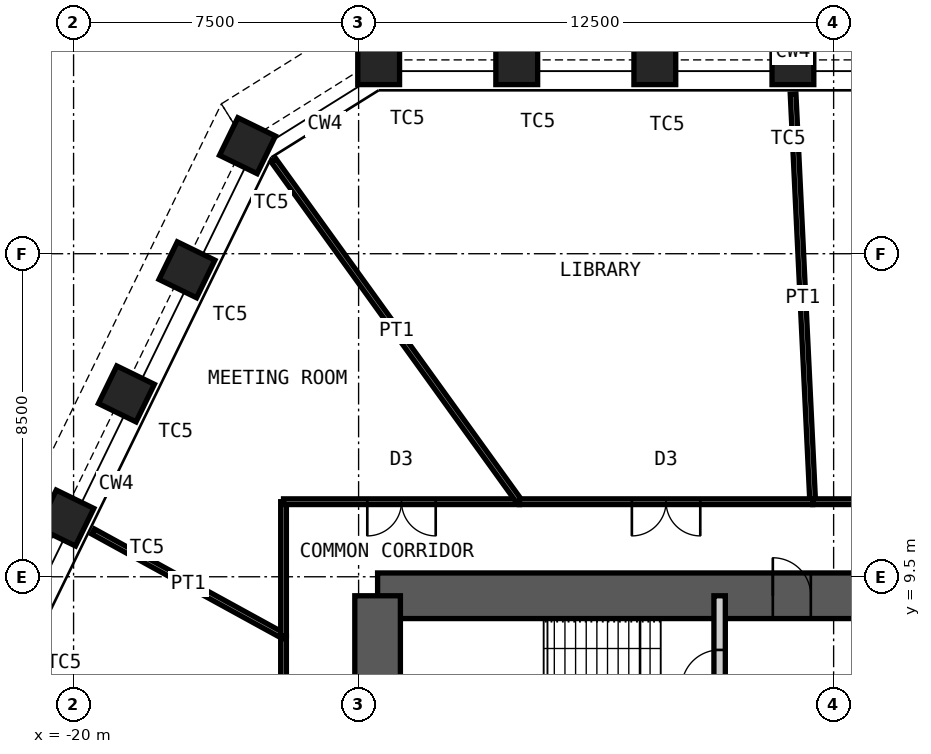
"""IFC4 building model, lengths in metres.
Left out: names, types, materials, properties, quantities, classifications, styles, units other than length and angle.
Written with IfcOpenShell. Run it as: python <this file> out.ifc"""

import sys

from ifc_helpers import new_model, si_unit, direction, frame, frame_2d, origin, origin_2d, place, context, subcontext, project, spatial, rectangle, hollow_rectangle, extrude, element, fill, save


model = new_model("IFC4")
c1 = context("Model", 3, precision=1e-05, world=origin(), true_north=direction((0.0, 1.0)))
c2 = subcontext(c1, "Body", "Model", "MODEL_VIEW")
j1 = project(units=[si_unit("LENGTHUNIT", "METRE"), si_unit("PLANEANGLEUNIT", "RADIAN")], contexts=[c1])
p1 = place(None, origin())
s1 = spatial("IfcSite", under=j1, at=p1, CompositionType="ELEMENT")
p2 = place(p1, origin())
s2 = spatial("IfcBuilding", under=s1, at=p2, CompositionType="ELEMENT")
p3 = place(p2, frame((0.0, 0.0, 218.2)))
s3 = spatial("IfcBuildingStorey", under=s2, at=p3, CompositionType="ELEMENT", Elevation=218.2)
for number, where, z_axis, x_axis in (
    (1, (-11.972, 23.0, 0.0), (0.0, 0.0, 1.0), (-1.0, 0.0, 0.0)),
    (2, (-8.338, 23.0, 0.0), (0.0, 0.0, 1.0), (-1.0, 0.0, 0.0)),
    (3, (-4.705, 23.0, 0.0), (0.0, 0.0, 1.0), (-1.0, 0.0, 0.0)),
    (4, (-1.071, 23.0, 0.0), (0.0, 0.0, 1.0), (-1.0, 0.0, 0.0)),
    (5, (-20.203, 11.045, 0.0), (0.0, 0.0, 1.0), (-0.438, -0.899, 0.0)),
    (6, (-18.61, 14.311, 0.0), (0.0, 0.0, 1.0), (-0.438, -0.899, 0.0)),
    (7, (-17.017, 17.577, 0.0), (0.0, 0.0, 1.0), (-0.438, -0.899, 0.0)),
    (8, (-15.424, 20.843, 0.0), (0.0, 0.0, 1.0), (-0.438, -0.899, 0.0)),
):
    element("IfcColumn", number, at=place(p3, frame(where, z_axis=z_axis, x_axis=x_axis)), inside=s3, PredefinedType="COLUMN", context=c2, shape_type="SweptSolid", body=[
        extrude(hollow_rectangle(XDim=1.1, YDim=1.1, WallThickness=0.07, at=origin_2d()), origin(), (0.0, 0.0, 1.0), 4.2),
    ])
p4 = place(p3, frame((-12.0, 9.0, 0.0), z_axis=(0.0, 0.0, 1.0), x_axis=(1.0, 0.0, 0.0)))
e9 = element("IfcWall", 9, at=p4, inside=s3, PredefinedType="SHEAR", context=c2, shape_type="SweptSolid", body=[
    extrude(rectangle(XDim=24.0, YDim=1.2, at=frame_2d((12.0, 0.0))), origin(), (0.0, 0.0, 1.0), 4.2),
])
p5 = place(p4, frame((10.4, 0.0, 0.0)))
e10 = element("IfcOpeningElement", 10, at=p5, cuts=e9, PredefinedType="OPENING", context=c2, shape_type="SweptSolid", body=[
    extrude(rectangle(XDim=1.0, YDim=2.1, at=frame_2d((0.5, 1.05))), frame((0.0, 0.61, 0.0), z_axis=(0.0, -1.0, 0.0), x_axis=(1.0, 0.0, 0.0)), (0.0, 0.0, 1.0), 1.22),
])
p6 = place(p4, frame((17.6, 0.0, 0.0)))
e11 = element("IfcOpeningElement", 11, at=p6, cuts=e9, PredefinedType="OPENING", context=c2, shape_type="SweptSolid", body=[
    extrude(rectangle(XDim=0.9, YDim=2.1, at=frame_2d((0.45, 1.05))), frame((0.0, 0.61, 0.0), z_axis=(0.0, -1.0, 0.0), x_axis=(1.0, 0.0, 0.0)), (0.0, 0.0, 1.0), 1.22),
])
p7 = place(p4, frame((21.9, 0.0, 0.0)))
e12 = element("IfcOpeningElement", 12, at=p7, cuts=e9, PredefinedType="OPENING", context=c2, shape_type="SweptSolid", body=[
    extrude(rectangle(XDim=0.9, YDim=2.1, at=frame_2d((0.45, 1.05))), frame((0.0, 0.61, 0.0), z_axis=(0.0, -1.0, 0.0), x_axis=(1.0, 0.0, 0.0)), (0.0, 0.0, 1.0), 1.22),
])
p8 = place(p3, frame((-12.0, -9.0, 0.0), z_axis=(0.0, 0.0, 1.0), x_axis=(0.0, 1.0, 0.0)))
e13 = element("IfcWall", 13, at=p8, inside=s3, PredefinedType="SHEAR", context=c2, shape_type="SweptSolid", body=[
    extrude(rectangle(XDim=18.0, YDim=1.2, at=frame_2d((9.0, 0.0))), origin(), (0.0, 0.0, 1.0), 4.2),
])
p9 = place(p8, frame((8.1, 0.0, 0.0)))
e14 = element("IfcOpeningElement", 14, at=p9, cuts=e13, PredefinedType="OPENING", context=c2, shape_type="SweptSolid", body=[
    extrude(rectangle(XDim=1.8, YDim=2.1, at=frame_2d((0.9, 1.05))), frame((0.0, 0.61, 0.0), z_axis=(0.0, -1.0, 0.0), x_axis=(1.0, 0.0, 0.0)), (0.0, 0.0, 1.0), 1.22),
])
p10 = place(p3, frame((-3.0, 5.15, 0.0), z_axis=(0.0, 0.0, 1.0), x_axis=(0.0, 1.0, 0.0)))
e15 = element("IfcWall", 15, at=p10, inside=s3, PredefinedType="PARTITIONING", context=c2, shape_type="SweptSolid", body=[
    extrude(rectangle(XDim=3.85, YDim=0.3, at=frame_2d((1.925, 0.0))), origin(), (0.0, 0.0, 1.0), 3.98),
])
p11 = place(p10, frame((1.425, 0.0, 0.0)))
e16 = element("IfcOpeningElement", 16, at=p11, cuts=e15, PredefinedType="OPENING", context=c2, shape_type="SweptSolid", body=[
    extrude(rectangle(XDim=1.0, YDim=2.1, at=frame_2d((0.5, 1.05))), frame((0.0, 0.16, 0.0), z_axis=(0.0, -1.0, 0.0), x_axis=(1.0, 0.0, 0.0)), (0.0, 0.0, 1.0), 0.32),
])
p12 = place(p3, frame((-1.067, 22.2, 0.0), z_axis=(0.0, 0.0, 1.0), x_axis=(0.047998335863, -0.998847415652, 0.0)))
e17 = element("IfcWall", 17, at=p12, inside=s3, PredefinedType="PARTITIONING", context=c2, shape_type="SweptSolid", body=[
    extrude(rectangle(XDim=10.738, YDim=0.15, at=frame_2d((5.369, 0.0))), origin(), (0.0, 0.0, 1.0), 3.43),
])
p13 = place(p3, frame((-0.551, 11.475, 0.0), z_axis=(0.0, 0.0, 1.0), x_axis=(1.0, 0.0, 0.0)))
e18 = element("IfcWall", 18, at=p13, inside=s3, PredefinedType="PARTITIONING", context=c2, shape_type="SweptSolid", body=[
    extrude(rectangle(XDim=15.026, YDim=0.15, at=frame_2d((7.513, 0.0))), origin(), (0.0, 0.0, 1.0), 4.03),
])
p14 = place(p13, frame((6.613, 0.0, 0.0)))
e19 = element("IfcOpeningElement", 19, at=p14, cuts=e18, PredefinedType="OPENING", context=c2, shape_type="SweptSolid", body=[
    extrude(rectangle(XDim=1.8, YDim=2.4, at=frame_2d((0.9, 1.2))), frame((0.0, 0.085, 0.0), z_axis=(0.0, -1.0, 0.0), x_axis=(1.0, 0.0, 0.0)), (0.0, 0.0, 1.0), 0.17),
])
p15 = place(p3, frame((-14.475, 2.676, 0.0), z_axis=(0.0, 0.0, 1.0), x_axis=(0.0, 1.0, 0.0)))
e20 = element("IfcWall", 20, at=p15, inside=s3, PredefinedType="PARTITIONING", context=c2, shape_type="SweptSolid", body=[
    extrude(rectangle(XDim=5.266, YDim=0.15, at=frame_2d((2.633, 0.0))), origin(), (0.0, 0.0, 1.0), 4.03),
])
p16 = place(p15, frame((2.133, 0.0, 0.0)))
e21 = element("IfcOpeningElement", 21, at=p16, cuts=e20, PredefinedType="OPENING", context=c2, shape_type="SweptSolid", body=[
    extrude(rectangle(XDim=1.0, YDim=2.4, at=frame_2d((0.5, 1.2))), frame((0.0, 0.085, 0.0), z_axis=(0.0, -1.0, 0.0), x_axis=(1.0, 0.0, 0.0)), (0.0, 0.0, 1.0), 0.17),
])
p17 = place(p3, frame((-19.486, 10.69, 0.0), z_axis=(0.0, 0.0, 1.0), x_axis=(0.876724089264, -0.480993629172, 0.0)))
e22 = element("IfcWall", 22, at=p17, inside=s3, PredefinedType="PARTITIONING", context=c2, shape_type="SweptSolid", body=[
    extrude(rectangle(XDim=5.715, YDim=0.15, at=frame_2d((2.858, 0.0))), origin(), (0.0, 0.0, 1.0), 3.43),
])
p18 = place(p3, frame((-14.475, 7.941, 0.0), z_axis=(0.0, 0.0, 1.0), x_axis=(0.0, 1.0, 0.0)))
e23 = element("IfcWall", 23, at=p18, inside=s3, PredefinedType="PARTITIONING", context=c2, shape_type="SweptSolid", body=[
    extrude(rectangle(XDim=3.534, YDim=0.15, at=frame_2d((1.767, 0.0))), origin(), (0.0, 0.0, 1.0), 4.03),
])
p19 = place(p3, frame((-14.475, 11.475, 0.0), z_axis=(0.0, 0.0, 1.0), x_axis=(1.0, 0.0, 0.0)))
e24 = element("IfcWall", 24, at=p19, inside=s3, PredefinedType="PARTITIONING", context=c2, shape_type="SweptSolid", body=[
    extrude(rectangle(XDim=6.208, YDim=0.15, at=frame_2d((3.104, 0.0))), origin(), (0.0, 0.0, 1.0), 4.03),
])
p20 = place(p19, frame((2.204, 0.0, 0.0)))
e25 = element("IfcOpeningElement", 25, at=p20, cuts=e24, PredefinedType="OPENING", context=c2, shape_type="SweptSolid", body=[
    extrude(rectangle(XDim=1.8, YDim=2.4, at=frame_2d((0.9, 1.2))), frame((0.0, 0.085, 0.0), z_axis=(0.0, -1.0, 0.0), x_axis=(1.0, 0.0, 0.0)), (0.0, 0.0, 1.0), 0.17),
])
p21 = place(p3, frame((-14.737, 20.455, 0.0), z_axis=(0.0, 0.0, 1.0), x_axis=(0.584547025688, -0.811359830629, 0.0)))
e26 = element("IfcWall", 26, at=p21, inside=s3, PredefinedType="PARTITIONING", context=c2, shape_type="SweptSolid", body=[
    extrude(rectangle(XDim=11.068, YDim=0.15, at=frame_2d((5.534, 0.0))), origin(), (0.0, 0.0, 1.0), 2.93),
])
p22 = place(p3, frame((-8.267, 11.475, 0.0), z_axis=(0.0, 0.0, 1.0), x_axis=(1.0, 0.0, 0.0)))
e27 = element("IfcWall", 27, at=p22, inside=s3, PredefinedType="PARTITIONING", context=c2, shape_type="SweptSolid", body=[
    extrude(rectangle(XDim=7.716, YDim=0.15, at=frame_2d((3.858, 0.0))), origin(), (0.0, 0.0, 1.0), 4.03),
])
p23 = place(p22, frame((2.958, 0.0, 0.0)))
e28 = element("IfcOpeningElement", 28, at=p23, cuts=e27, PredefinedType="OPENING", context=c2, shape_type="SweptSolid", body=[
    extrude(rectangle(XDim=1.8, YDim=2.4, at=frame_2d((0.9, 1.2))), frame((0.0, 0.085, 0.0), z_axis=(0.0, -1.0, 0.0), x_axis=(1.0, 0.0, 0.0)), (0.0, 0.0, 1.0), 0.17),
])
p24 = place(p5, origin())
e29 = element("IfcDoor", 29, at=p24, inside=s3, OperationType="SINGLE_SWING_RIGHT", PredefinedType="DOOR", context=c2, shape_type="SweptSolid", body=[
    extrude(rectangle(XDim=1.0, YDim=2.1, at=frame_2d((0.5, 1.05))), frame((0.0, 0.025, 0.0), z_axis=(0.0, -1.0, 0.0), x_axis=(1.0, 0.0, 0.0)), (0.0, 0.0, 1.0), 0.05),
])
fill(e10, e29)
p25 = place(p11, origin())
e30 = element("IfcDoor", 30, at=p25, inside=s3, OperationType="SINGLE_SWING_RIGHT", PredefinedType="DOOR", context=c2, shape_type="SweptSolid", body=[
    extrude(rectangle(XDim=1.0, YDim=2.1, at=frame_2d((0.5, 1.05))), frame((0.0, 0.025, 0.0), z_axis=(0.0, -1.0, 0.0), x_axis=(1.0, 0.0, 0.0)), (0.0, 0.0, 1.0), 0.05),
])
fill(e16, e30)
p26 = place(p20, origin())
e31 = element("IfcDoor", 31, at=p26, inside=s3, OperationType="DOUBLE_DOOR_DOUBLE_SWING", PredefinedType="DOOR", context=c2, shape_type="SweptSolid", body=[
    extrude(rectangle(XDim=1.8, YDim=2.4, at=frame_2d((0.9, 1.2))), frame((0.0, 0.025, 0.0), z_axis=(0.0, -1.0, 0.0), x_axis=(1.0, 0.0, 0.0)), (0.0, 0.0, 1.0), 0.05),
])
fill(e25, e31)
p27 = place(p23, origin())
e32 = element("IfcDoor", 32, at=p27, inside=s3, OperationType="DOUBLE_DOOR_DOUBLE_SWING", PredefinedType="DOOR", context=c2, shape_type="SweptSolid", body=[
    extrude(rectangle(XDim=1.8, YDim=2.4, at=frame_2d((0.9, 1.2))), frame((0.0, 0.025, 0.0), z_axis=(0.0, -1.0, 0.0), x_axis=(1.0, 0.0, 0.0)), (0.0, 0.0, 1.0), 0.05),
])
fill(e28, e32)
save(model, sys.argv[1])
